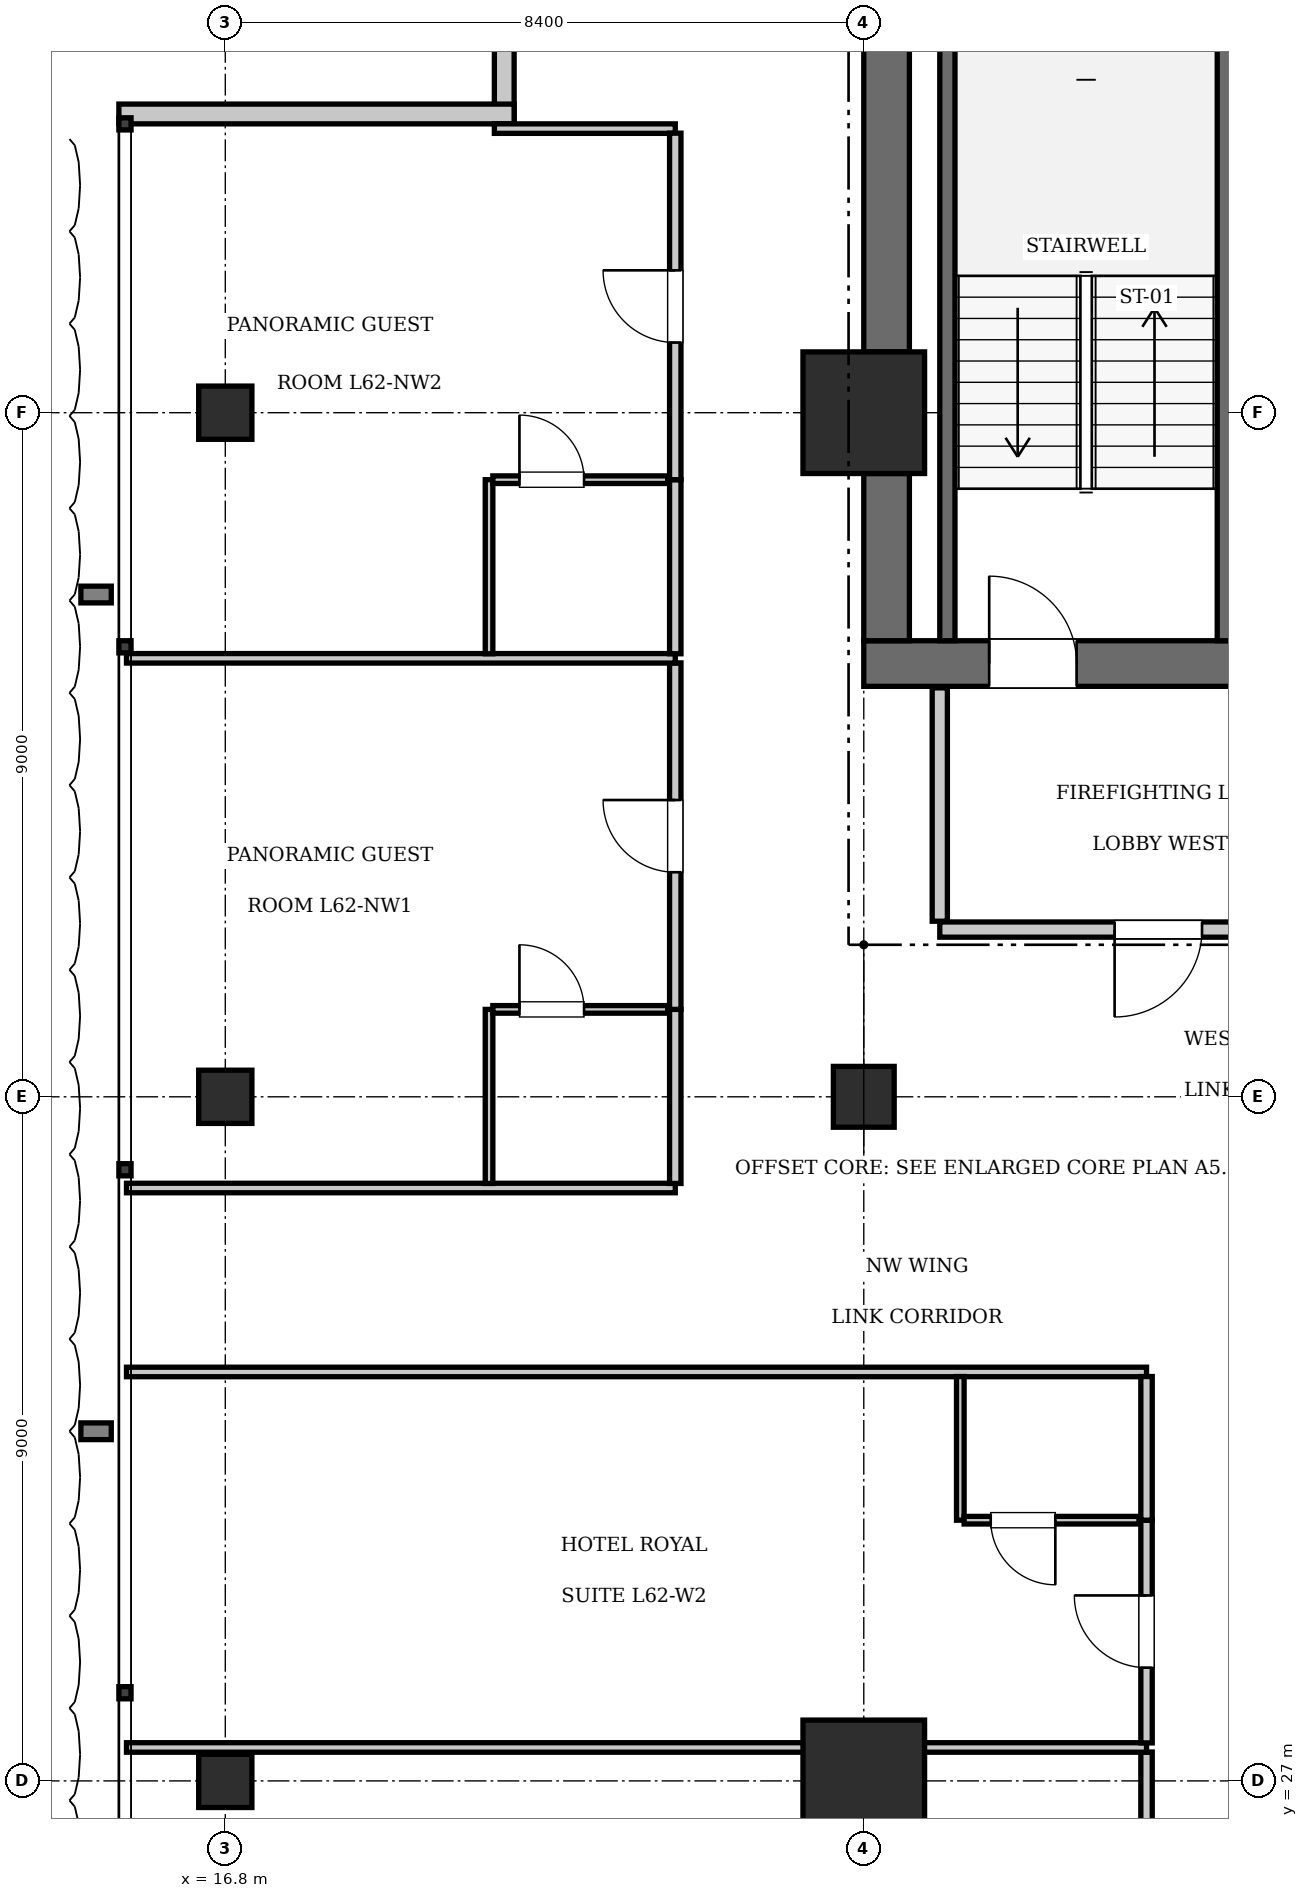
"""IFC4 building model, lengths in metres.
Left out: names, types, materials, properties, quantities, classifications, styles, units other than length and angle.
Written with IfcOpenShell. Run it as: python <this file> out.ifc"""

import sys

from ifc_helpers import new_model, si_unit, direction, frame, frame_2d, origin, origin_2d, place, context, subcontext, project, spatial, rectangle, extrude, element, fill, save


model = new_model("IFC4")
c1 = context("Model", 3, precision=1e-05, world=origin(), true_north=direction((0.0, 1.0)))
c2 = subcontext(c1, "Body", "Model", "MODEL_VIEW")
j1 = project(units=[si_unit("LENGTHUNIT", "METRE"), si_unit("PLANEANGLEUNIT", "RADIAN")], contexts=[c1])
p1 = place(None, origin())
s1 = spatial("IfcSite", under=j1, at=p1, CompositionType="ELEMENT")
p2 = place(p1, origin())
s2 = spatial("IfcBuilding", under=s1, at=p2, CompositionType="ELEMENT")
p3 = place(p2, frame((0.0, 0.0, 254.8)))
s3 = spatial("IfcBuildingStorey", under=s2, at=p3, CompositionType="ELEMENT", Elevation=254.8)
for number, where, z_axis, x_axis in (
    (1, (25.2, 27.0, 0.0), (0.0, 0.0, 1.0), (1.0, 0.0, 0.0)),
    (2, (25.2, 45.0, 0.0), (0.0, 0.0, 1.0), (1.0, 0.0, 0.0)),
):
    element("IfcColumn", number, at=place(p3, frame(where, z_axis=z_axis, x_axis=x_axis)), inside=s3, PredefinedType="COLUMN", context=c2, shape_type="SweptSolid", body=[
        extrude(rectangle(XDim=1.6, YDim=1.6, at=origin_2d()), origin(), (0.0, 0.0, 1.0), 3.85),
    ])
p4 = place(p3, frame((25.2, 41.7, 0.0), z_axis=(0.0, 0.0, 1.0), x_axis=(1.0, 0.0, 0.0)))
e3 = element("IfcWall", 3, at=p4, inside=s3, PredefinedType="SHEAR", context=c2, shape_type="SweptSolid", body=[
    extrude(rectangle(XDim=6.8, YDim=0.6, at=frame_2d((3.4, 0.0))), origin(), (0.0, 0.0, 1.0), 3.85),
])
p5 = place(p4, frame((1.65, 0.0, 0.0)))
e4 = element("IfcOpeningElement", 4, at=p5, cuts=e3, PredefinedType="OPENING", context=c2, shape_type="SweptSolid", body=[
    extrude(rectangle(XDim=1.15, YDim=2.15, at=frame_2d((0.575, 1.075))), frame((0.0, 0.31, 0.0), z_axis=(0.0, -1.0, 0.0), x_axis=(1.0, 0.0, 0.0)), (0.0, 0.0, 1.0), 0.62),
])
p6 = place(p4, frame((5.15, 0.0, 0.0)))
e5 = element("IfcOpeningElement", 5, at=p6, cuts=e3, PredefinedType="OPENING", context=c2, shape_type="SweptSolid", body=[
    extrude(rectangle(XDim=1.1, YDim=2.2, at=frame_2d((0.55, 1.1))), frame((0.0, 0.31, 0.0), z_axis=(0.0, -1.0, 0.0), x_axis=(1.0, 0.0, 0.0)), (0.0, 0.0, 1.0), 0.62),
])
p7 = place(p3, frame((25.5, 42.0, 0.0), z_axis=(0.0, 0.0, 1.0), x_axis=(0.0, 1.0, 0.0)))
e6 = element("IfcWall", 6, at=p7, inside=s3, PredefinedType="SHEAR", context=c2, shape_type="SweptSolid", body=[
    extrude(rectangle(XDim=2.2, YDim=0.6, at=frame_2d((1.1, 0.0))), origin(), (0.0, 0.0, 1.0), 3.85),
])
p8 = place(p3, frame((25.5, 45.8, 0.0), z_axis=(0.0, 0.0, 1.0), x_axis=(0.0, 1.0, 0.0)))
e7 = element("IfcWall", 7, at=p8, inside=s3, PredefinedType="SHEAR", context=c2, shape_type="SweptSolid", body=[
    extrude(rectangle(XDim=7.6, YDim=0.6, at=frame_2d((3.8, 0.0))), origin(), (0.0, 0.0, 1.0), 3.85),
])
p9 = place(p3, frame((25.2, 36.0, 0.0), z_axis=(0.0, 0.0, 1.0), x_axis=(1.0, 0.0, 0.0)))
e8 = element("IfcColumn", 8, at=p9, inside=s3, PredefinedType="COLUMN", context=c2, shape_type="SweptSolid", body=[
    extrude(rectangle(XDim=0.8, YDim=0.8, at=origin_2d()), origin(), (0.0, 0.0, 1.0), 3.85),
])
for number, where, z_axis, x_axis in (
    (9, (16.8, 27.0, 0.0), (0.0, 0.0, 1.0), (1.0, 0.0, 0.0)),
    (10, (16.8, 36.0, 0.0), (0.0, 0.0, 1.0), (1.0, 0.0, 0.0)),
    (11, (16.8, 45.0, 0.0), (0.0, 0.0, 1.0), (1.0, 0.0, 0.0)),
):
    element("IfcColumn", number, at=place(p3, frame(where, z_axis=z_axis, x_axis=x_axis)), inside=s3, PredefinedType="COLUMN", context=c2, shape_type="SweptSolid", body=[
        extrude(rectangle(XDim=0.7, YDim=0.7, at=origin_2d()), origin(), (0.0, 0.0, 1.0), 3.85),
    ])
p10 = place(p3, frame((29.95, 42.0, 0.0), z_axis=(0.0, 0.0, 1.0), x_axis=(0.0, 1.0, 0.0)))
e12 = element("IfcWall", 12, at=p10, inside=s3, PredefinedType="SOLIDWALL", context=c2, shape_type="SweptSolid", body=[
    extrude(rectangle(XDim=9.15, YDim=0.2, at=frame_2d((4.575, 0.0))), origin(), (0.0, 0.0, 1.0), 3.61),
])
p11 = place(p3, frame((26.3, 42.0, 0.0), z_axis=(0.0, 0.0, 1.0), x_axis=(0.0, 1.0, 0.0)))
e13 = element("IfcWall", 13, at=p11, inside=s3, PredefinedType="SOLIDWALL", context=c2, shape_type="SweptSolid", body=[
    extrude(rectangle(XDim=9.12, YDim=0.2, at=frame_2d((4.56, 0.0))), origin(), (0.0, 0.0, 1.0), 3.61),
])
p12 = place(p3, frame((20.47, 48.8, 0.0), z_axis=(0.0, 0.0, 1.0), x_axis=(0.0, 1.0, 0.0)))
e14 = element("IfcWall", 14, at=p12, inside=s3, PredefinedType="SOLIDWALL", context=c2, shape_type="SweptSolid", body=[
    extrude(rectangle(XDim=5.2, YDim=0.26, at=frame_2d((2.6, 0.0))), origin(), (0.0, 0.0, 1.0), 3.61),
])
p13 = place(p3, frame((15.4, 48.93, 0.0), z_axis=(0.0, 0.0, 1.0), x_axis=(1.0, 0.0, 0.0)))
e15 = element("IfcWall", 15, at=p13, inside=s3, PredefinedType="SOLIDWALL", context=c2, shape_type="SweptSolid", body=[
    extrude(rectangle(XDim=5.2, YDim=0.26, at=frame_2d((2.6, 0.0))), origin(), (0.0, 0.0, 1.0), 3.61),
])
p14 = place(p3, frame((26.2, 38.2, 0.0), z_axis=(0.0, 0.0, 1.0), x_axis=(1.0, 0.0, 0.0)))
e16 = element("IfcWall", 16, at=p14, inside=s3, PredefinedType="PARTITIONING", context=c2, shape_type="SweptSolid", body=[
    extrude(rectangle(XDim=5.8, YDim=0.2, at=frame_2d((2.9, 0.0))), origin(), (0.0, 0.0, 1.0), 3.61),
])
p15 = place(p14, frame((2.3, 0.0, 0.0)))
e17 = element("IfcOpeningElement", 17, at=p15, cuts=e16, PredefinedType="OPENING", context=c2, shape_type="SweptSolid", body=[
    extrude(rectangle(XDim=1.15, YDim=2.15, at=frame_2d((0.575, 1.075))), frame((0.0, 0.11, 0.0), z_axis=(0.0, -1.0, 0.0), x_axis=(1.0, 0.0, 0.0)), (0.0, 0.0, 1.0), 0.22),
])
p16 = place(p3, frame((26.2, 38.31, 0.0), z_axis=(0.0, 0.0, 1.0), x_axis=(0.0, 1.0, 0.0)))
e18 = element("IfcWall", 18, at=p16, inside=s3, PredefinedType="PARTITIONING", context=c2, shape_type="SweptSolid", body=[
    extrude(rectangle(XDim=3.07, YDim=0.2, at=frame_2d((1.535, 0.0))), origin(), (0.0, 0.0, 1.0), 3.61),
])
p17 = place(p3, frame((15.5, 32.38, 0.0), z_axis=(0.0, 0.0, 1.0), x_axis=(1.0, 0.0, 0.0)))
e19 = element("IfcWall", 19, at=p17, inside=s3, PredefinedType="PARTITIONING", context=c2, shape_type="SweptSolid", body=[
    extrude(rectangle(XDim=13.42, YDim=0.125, at=frame_2d((6.71, 0.0))), origin(), (0.0, 0.0, 1.0), 3.61),
])
p18 = place(p3, frame((28.92, 24.45, 0.0), z_axis=(0.0, 0.0, 1.0), x_axis=(0.0, 1.0, 0.0)))
e20 = element("IfcWall", 20, at=p18, inside=s3, PredefinedType="PARTITIONING", context=c2, shape_type="SweptSolid", body=[
    extrude(rectangle(XDim=2.93, YDim=0.15, at=frame_2d((1.465, 0.0))), origin(), (0.0, 0.0, 1.0), 3.61),
])
p19 = place(p18, frame((0.99, 0.0, 0.0)))
e21 = element("IfcOpeningElement", 21, at=p19, cuts=e20, PredefinedType="OPENING", context=c2, shape_type="SweptSolid", body=[
    extrude(rectangle(XDim=0.95, YDim=2.15, at=frame_2d((0.475, 1.075))), frame((0.0, 0.085, 0.0), z_axis=(0.0, -1.0, 0.0), x_axis=(1.0, 0.0, 0.0)), (0.0, 0.0, 1.0), 0.17),
])
p20 = place(p3, frame((15.5, 27.44, 0.0), z_axis=(0.0, 0.0, 1.0), x_axis=(1.0, 0.0, 0.0)))
e22 = element("IfcWall", 22, at=p20, inside=s3, PredefinedType="PARTITIONING", context=c2, shape_type="SweptSolid", body=[
    extrude(rectangle(XDim=13.42, YDim=0.125, at=frame_2d((6.71, 0.0))), origin(), (0.0, 0.0, 1.0), 3.61),
])
p21 = place(p3, frame((28.92, 27.5, 0.0), z_axis=(0.0, 0.0, 1.0), x_axis=(0.0, 1.0, 0.0)))
e23 = element("IfcWall", 23, at=p21, inside=s3, PredefinedType="PARTITIONING", context=c2, shape_type="SweptSolid", body=[
    extrude(rectangle(XDim=2.93, YDim=0.15, at=frame_2d((1.465, 0.0))), origin(), (0.0, 0.0, 1.0), 3.61),
])
p22 = place(p21, frame((0.99, 0.0, 0.0)))
e24 = element("IfcOpeningElement", 24, at=p22, cuts=e23, PredefinedType="OPENING", context=c2, shape_type="SweptSolid", body=[
    extrude(rectangle(XDim=0.95, YDim=2.15, at=frame_2d((0.475, 1.075))), frame((0.0, 0.085, 0.0), z_axis=(0.0, -1.0, 0.0), x_axis=(1.0, 0.0, 0.0)), (0.0, 0.0, 1.0), 0.17),
])
p23 = place(p3, frame((28.92, 30.43, 0.0), z_axis=(0.0, 0.0, 1.0), x_axis=(0.0, 1.0, 0.0)))
e25 = element("IfcWall", 25, at=p23, inside=s3, PredefinedType="PARTITIONING", context=c2, shape_type="SweptSolid", body=[
    extrude(rectangle(XDim=1.89, YDim=0.15, at=frame_2d((0.945, 0.0))), origin(), (0.0, 0.0, 1.0), 3.61),
])
p24 = place(p3, frame((26.47, 30.43, 0.0), z_axis=(0.0, 0.0, 1.0), x_axis=(0.0, 1.0, 0.0)))
e26 = element("IfcWall", 26, at=p24, inside=s3, PredefinedType="PARTITIONING", context=c2, shape_type="SweptSolid", body=[
    extrude(rectangle(XDim=1.89, YDim=0.1, at=frame_2d((0.945, 0.0))), origin(), (0.0, 0.0, 1.0), 3.61),
])
p25 = place(p3, frame((26.52, 30.43, 0.0), z_axis=(0.0, 0.0, 1.0), x_axis=(1.0, 0.0, 0.0)))
e27 = element("IfcWall", 27, at=p25, inside=s3, PredefinedType="PARTITIONING", context=c2, shape_type="SweptSolid", body=[
    extrude(rectangle(XDim=2.3, YDim=0.1, at=frame_2d((1.15, 0.0))), origin(), (0.0, 0.0, 1.0), 3.61),
])
p26 = place(p25, frame((0.35, 0.0, 0.0)))
e28 = element("IfcOpeningElement", 28, at=p26, cuts=e27, PredefinedType="OPENING", context=c2, shape_type="SweptSolid", body=[
    extrude(rectangle(XDim=0.85, YDim=2.1, at=frame_2d((0.425, 1.05))), frame((0.0, 0.06, 0.0), z_axis=(0.0, -1.0, 0.0), x_axis=(1.0, 0.0, 0.0)), (0.0, 0.0, 1.0), 0.12),
])
p27 = place(p3, frame((15.5, 34.8, 0.0), z_axis=(0.0, 0.0, 1.0), x_axis=(1.0, 0.0, 0.0)))
e29 = element("IfcWall", 29, at=p27, inside=s3, PredefinedType="PARTITIONING", context=c2, shape_type="SweptSolid", body=[
    extrude(rectangle(XDim=7.22, YDim=0.125, at=frame_2d((3.61, 0.0))), origin(), (0.0, 0.0, 1.0), 3.61),
])
p28 = place(p3, frame((20.34, 48.738, 0.0), z_axis=(0.0, 0.0, 1.0), x_axis=(1.0, 0.0, 0.0)))
e30 = element("IfcWall", 30, at=p28, inside=s3, PredefinedType="PARTITIONING", context=c2, shape_type="SweptSolid", body=[
    extrude(rectangle(XDim=2.38, YDim=0.125, at=frame_2d((1.19, 0.0))), origin(), (0.0, 0.0, 1.0), 3.61),
])
p29 = place(p3, frame((22.72, 34.86, 0.0), z_axis=(0.0, 0.0, 1.0), x_axis=(0.0, 1.0, 0.0)))
e31 = element("IfcWall", 31, at=p29, inside=s3, PredefinedType="PARTITIONING", context=c2, shape_type="SweptSolid", body=[
    extrude(rectangle(XDim=2.29, YDim=0.15, at=frame_2d((1.145, 0.0))), origin(), (0.0, 0.0, 1.0), 3.61),
])
p30 = place(p3, frame((22.72, 37.15, 0.0), z_axis=(0.0, 0.0, 1.0), x_axis=(0.0, 1.0, 0.0)))
e32 = element("IfcWall", 32, at=p30, inside=s3, PredefinedType="PARTITIONING", context=c2, shape_type="SweptSolid", body=[
    extrude(rectangle(XDim=4.559, YDim=0.15, at=frame_2d((2.279, 0.0))), origin(), (0.0, 0.0, 1.0), 3.61),
])
p31 = place(p30, frame((1.804, 0.0, 0.0)))
e33 = element("IfcOpeningElement", 33, at=p31, cuts=e32, PredefinedType="OPENING", context=c2, shape_type="SweptSolid", body=[
    extrude(rectangle(XDim=0.95, YDim=2.15, at=frame_2d((0.475, 1.075))), frame((0.0, 0.085, 0.0), z_axis=(0.0, -1.0, 0.0), x_axis=(1.0, 0.0, 0.0)), (0.0, 0.0, 1.0), 0.17),
])
p32 = place(p3, frame((20.27, 34.86, 0.0), z_axis=(0.0, 0.0, 1.0), x_axis=(0.0, 1.0, 0.0)))
e34 = element("IfcWall", 34, at=p32, inside=s3, PredefinedType="PARTITIONING", context=c2, shape_type="SweptSolid", body=[
    extrude(rectangle(XDim=2.29, YDim=0.1, at=frame_2d((1.145, 0.0))), origin(), (0.0, 0.0, 1.0), 3.61),
])
p33 = place(p3, frame((20.32, 37.15, 0.0), z_axis=(0.0, 0.0, 1.0), x_axis=(1.0, 0.0, 0.0)))
e35 = element("IfcWall", 35, at=p33, inside=s3, PredefinedType="PARTITIONING", context=c2, shape_type="SweptSolid", body=[
    extrude(rectangle(XDim=2.3, YDim=0.1, at=frame_2d((1.15, 0.0))), origin(), (0.0, 0.0, 1.0), 3.61),
])
p34 = place(p33, frame((0.35, 0.0, 0.0)))
e36 = element("IfcOpeningElement", 36, at=p34, cuts=e35, PredefinedType="OPENING", context=c2, shape_type="SweptSolid", body=[
    extrude(rectangle(XDim=0.85, YDim=2.1, at=frame_2d((0.425, 1.05))), frame((0.0, 0.06, 0.0), z_axis=(0.0, -1.0, 0.0), x_axis=(1.0, 0.0, 0.0)), (0.0, 0.0, 1.0), 0.12),
])
p35 = place(p3, frame((15.5, 41.769, 0.0), z_axis=(0.0, 0.0, 1.0), x_axis=(1.0, 0.0, 0.0)))
e37 = element("IfcWall", 37, at=p35, inside=s3, PredefinedType="PARTITIONING", context=c2, shape_type="SweptSolid", body=[
    extrude(rectangle(XDim=7.22, YDim=0.125, at=frame_2d((3.61, 0.0))), origin(), (0.0, 0.0, 1.0), 3.61),
])
p36 = place(p3, frame((22.72, 41.829, 0.0), z_axis=(0.0, 0.0, 1.0), x_axis=(0.0, 1.0, 0.0)))
e38 = element("IfcWall", 38, at=p36, inside=s3, PredefinedType="PARTITIONING", context=c2, shape_type="SweptSolid", body=[
    extrude(rectangle(XDim=2.29, YDim=0.15, at=frame_2d((1.145, 0.0))), origin(), (0.0, 0.0, 1.0), 3.61),
])
p37 = place(p3, frame((22.72, 44.119, 0.0), z_axis=(0.0, 0.0, 1.0), x_axis=(0.0, 1.0, 0.0)))
e39 = element("IfcWall", 39, at=p37, inside=s3, PredefinedType="PARTITIONING", context=c2, shape_type="SweptSolid", body=[
    extrude(rectangle(XDim=4.559, YDim=0.15, at=frame_2d((2.279, 0.0))), origin(), (0.0, 0.0, 1.0), 3.61),
])
p38 = place(p37, frame((1.804, 0.0, 0.0)))
e40 = element("IfcOpeningElement", 40, at=p38, cuts=e39, PredefinedType="OPENING", context=c2, shape_type="SweptSolid", body=[
    extrude(rectangle(XDim=0.95, YDim=2.15, at=frame_2d((0.475, 1.075))), frame((0.0, 0.085, 0.0), z_axis=(0.0, -1.0, 0.0), x_axis=(1.0, 0.0, 0.0)), (0.0, 0.0, 1.0), 0.17),
])
p39 = place(p3, frame((20.27, 41.829, 0.0), z_axis=(0.0, 0.0, 1.0), x_axis=(0.0, 1.0, 0.0)))
e41 = element("IfcWall", 41, at=p39, inside=s3, PredefinedType="PARTITIONING", context=c2, shape_type="SweptSolid", body=[
    extrude(rectangle(XDim=2.29, YDim=0.1, at=frame_2d((1.145, 0.0))), origin(), (0.0, 0.0, 1.0), 3.61),
])
p40 = place(p3, frame((20.32, 44.119, 0.0), z_axis=(0.0, 0.0, 1.0), x_axis=(1.0, 0.0, 0.0)))
e42 = element("IfcWall", 42, at=p40, inside=s3, PredefinedType="PARTITIONING", context=c2, shape_type="SweptSolid", body=[
    extrude(rectangle(XDim=2.3, YDim=0.1, at=frame_2d((1.15, 0.0))), origin(), (0.0, 0.0, 1.0), 3.61),
])
p41 = place(p40, frame((0.35, 0.0, 0.0)))
e43 = element("IfcOpeningElement", 43, at=p41, cuts=e42, PredefinedType="OPENING", context=c2, shape_type="SweptSolid", body=[
    extrude(rectangle(XDim=0.85, YDim=2.1, at=frame_2d((0.425, 1.05))), frame((0.0, 0.06, 0.0), z_axis=(0.0, -1.0, 0.0), x_axis=(1.0, 0.0, 0.0)), (0.0, 0.0, 1.0), 0.12),
])
p42 = place(p5, origin())
e44 = element("IfcDoor", 44, at=p42, inside=s3, OperationType="SINGLE_SWING_LEFT", PredefinedType="DOOR", context=c2, shape_type="SweptSolid", body=[
    extrude(rectangle(XDim=1.15, YDim=2.15, at=frame_2d((0.575, 1.075))), frame((0.0, 0.025, 0.0), z_axis=(0.0, -1.0, 0.0), x_axis=(1.0, 0.0, 0.0)), (0.0, 0.0, 1.0), 0.05),
])
fill(e4, e44)
p43 = place(p15, frame((1.15, 0.0, 0.0), z_axis=(0.0, 0.0, 1.0), x_axis=(-1.0, 0.0, 0.0)))
e45 = element("IfcDoor", 45, at=p43, inside=s3, OperationType="SINGLE_SWING_RIGHT", PredefinedType="DOOR", context=c2, shape_type="SweptSolid", body=[
    extrude(rectangle(XDim=1.15, YDim=2.15, at=frame_2d((0.575, 1.075))), frame((0.0, 0.025, 0.0), z_axis=(0.0, -1.0, 0.0), x_axis=(1.0, 0.0, 0.0)), (0.0, 0.0, 1.0), 0.05),
])
fill(e17, e45)
p44 = place(p26, frame((0.85, 0.0, 0.0), z_axis=(0.0, 0.0, 1.0), x_axis=(-1.0, 0.0, 0.0)))
e46 = element("IfcDoor", 46, at=p44, inside=s3, OperationType="SINGLE_SWING_LEFT", PredefinedType="DOOR", context=c2, shape_type="SweptSolid", body=[
    extrude(rectangle(XDim=0.85, YDim=2.1, at=frame_2d((0.425, 1.05))), frame((0.0, 0.025, 0.0), z_axis=(0.0, -1.0, 0.0), x_axis=(1.0, 0.0, 0.0)), (0.0, 0.0, 1.0), 0.05),
])
fill(e28, e46)
p45 = place(p22, origin())
e47 = element("IfcDoor", 47, at=p45, inside=s3, OperationType="SINGLE_SWING_RIGHT", PredefinedType="DOOR", context=c2, shape_type="SweptSolid", body=[
    extrude(rectangle(XDim=0.95, YDim=2.15, at=frame_2d((0.475, 1.075))), frame((0.0, 0.025, 0.0), z_axis=(0.0, -1.0, 0.0), x_axis=(1.0, 0.0, 0.0)), (0.0, 0.0, 1.0), 0.05),
])
fill(e24, e47)
p46 = place(p34, origin())
e48 = element("IfcDoor", 48, at=p46, inside=s3, OperationType="SINGLE_SWING_LEFT", PredefinedType="DOOR", context=c2, shape_type="SweptSolid", body=[
    extrude(rectangle(XDim=0.85, YDim=2.1, at=frame_2d((0.425, 1.05))), frame((0.0, 0.025, 0.0), z_axis=(0.0, -1.0, 0.0), x_axis=(1.0, 0.0, 0.0)), (0.0, 0.0, 1.0), 0.05),
])
fill(e36, e48)
p47 = place(p31, origin())
e49 = element("IfcDoor", 49, at=p47, inside=s3, OperationType="SINGLE_SWING_RIGHT", PredefinedType="DOOR", context=c2, shape_type="SweptSolid", body=[
    extrude(rectangle(XDim=0.95, YDim=2.15, at=frame_2d((0.475, 1.075))), frame((0.0, 0.025, 0.0), z_axis=(0.0, -1.0, 0.0), x_axis=(1.0, 0.0, 0.0)), (0.0, 0.0, 1.0), 0.05),
])
fill(e33, e49)
p48 = place(p41, origin())
e50 = element("IfcDoor", 50, at=p48, inside=s3, OperationType="SINGLE_SWING_LEFT", PredefinedType="DOOR", context=c2, shape_type="SweptSolid", body=[
    extrude(rectangle(XDim=0.85, YDim=2.1, at=frame_2d((0.425, 1.05))), frame((0.0, 0.025, 0.0), z_axis=(0.0, -1.0, 0.0), x_axis=(1.0, 0.0, 0.0)), (0.0, 0.0, 1.0), 0.05),
])
fill(e43, e50)
p49 = place(p38, origin())
e51 = element("IfcDoor", 51, at=p49, inside=s3, OperationType="SINGLE_SWING_RIGHT", PredefinedType="DOOR", context=c2, shape_type="SweptSolid", body=[
    extrude(rectangle(XDim=0.95, YDim=2.15, at=frame_2d((0.475, 1.075))), frame((0.0, 0.025, 0.0), z_axis=(0.0, -1.0, 0.0), x_axis=(1.0, 0.0, 0.0)), (0.0, 0.0, 1.0), 0.05),
])
fill(e40, e51)
save(model, sys.argv[1])
